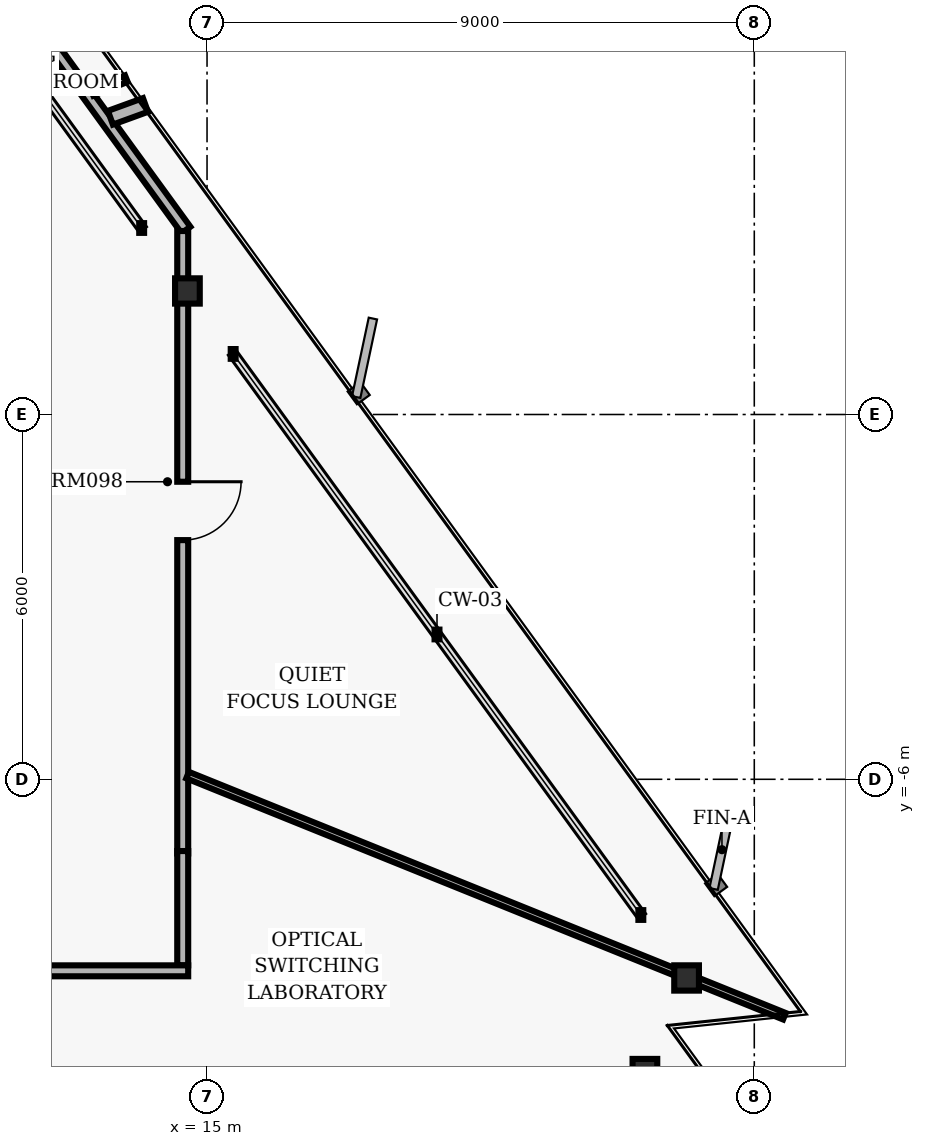
"""IFC4 building model, lengths in metres.
Left out: names, types, materials, properties, quantities, classifications, styles, units other than length and angle.
Written with IfcOpenShell. Run it as: python <this file> out.ifc"""

import sys

from ifc_helpers import new_model, si_unit, direction, frame, frame_2d, origin, origin_2d, place, context, subcontext, project, spatial, rectangle, i_section, extrude, element, fill, save


model = new_model("IFC4")
c1 = context("Model", 3, precision=1e-05, world=origin(), true_north=direction((0.0, 1.0)))
c2 = subcontext(c1, "Body", "Model", "MODEL_VIEW")
j1 = project(units=[si_unit("LENGTHUNIT", "METRE"), si_unit("PLANEANGLEUNIT", "RADIAN")], contexts=[c1])
p1 = place(None, origin())
s1 = spatial("IfcSite", under=j1, at=p1, CompositionType="ELEMENT")
p2 = place(p1, origin())
s2 = spatial("IfcBuilding", under=s1, at=p2, CompositionType="ELEMENT")
p3 = place(p2, frame((0.0, 0.0, 119.84)))
s3 = spatial("IfcBuildingStorey", under=s2, at=p3, CompositionType="ELEMENT", Elevation=119.84)
for number, where, z_axis, x_axis in (
    (1, (22.887, -9.268, 0.0), (0.0, 0.0, 1.0), (1.0, 0.0, 0.0)),
    (2, (14.677, 2.032, 0.0), (0.0, 0.0, 1.0), (1.0, 0.0, 0.0)),
    (3, (22.201, -10.807, 0.0), (0.0, 0.0, 1.0), (1.0, 0.0, 0.0)),
):
    element("IfcColumn", number, at=place(p3, frame(where, z_axis=z_axis, x_axis=x_axis)), inside=s3, PredefinedType="COLUMN", context=c2, shape_type="SweptSolid", body=[
        extrude(i_section(OverallWidth=0.406, OverallDepth=0.416, WebThickness=0.03, FlangeThickness=0.048, FilletRadius=0.02, at=origin_2d()), origin(), (0.0, 0.0, 1.0), 3.04),
    ])
p4 = place(p3, frame((10.263, 9.077, 0.0), z_axis=(0.0, 0.0, 1.0), x_axis=(0.587780951295, -0.809020119215, 0.0)))
e4 = element("IfcWall", 4, at=p4, inside=s3, PredefinedType="PARTITIONING", context=c2, shape_type="SweptSolid", body=[
    extrude(rectangle(XDim=7.469, YDim=0.18, at=frame_2d((3.734, 0.0))), origin(), (0.0, 0.0, 1.0), 2.763),
])
p5 = place(p3, frame((14.6, 3.018, 0.0), z_axis=(0.0, 0.0, 1.0), x_axis=(0.0, -1.0, 0.0)))
e5 = element("IfcWall", 5, at=p5, inside=s3, PredefinedType="PARTITIONING", context=c2, shape_type="SweptSolid", body=[
    extrude(rectangle(XDim=10.238, YDim=0.18, at=frame_2d((5.119, 0.0))), origin(), (0.0, 0.0, 1.0), 2.763),
])
p6 = place(p5, frame((4.124, 0.0, 0.0)))
e6 = element("IfcOpeningElement", 6, at=p6, cuts=e5, PredefinedType="OPENING", context=c2, shape_type="SweptSolid", body=[
    extrude(rectangle(XDim=0.96, YDim=2.02, at=frame_2d((0.48, 1.01))), frame((0.0, 0.1, 0.0), z_axis=(0.0, -1.0, 0.0), x_axis=(1.0, 0.0, 0.0)), (0.0, 0.0, 1.0), 0.2),
])
p7 = place(p3, frame((14.6, -7.18, 0.0), z_axis=(0.0, 0.0, 1.0), x_axis=(0.0, -1.0, 0.0)))
e7 = element("IfcWall", 7, at=p7, inside=s3, PredefinedType="PARTITIONING", context=c2, shape_type="SweptSolid", body=[
    extrude(rectangle(XDim=1.88, YDim=0.18, at=frame_2d((0.94, 0.0))), origin(), (0.0, 0.0, 1.0), 2.763),
])
p8 = place(p3, frame((14.69, -9.15, 0.0), z_axis=(0.0, 0.0, 1.0), x_axis=(-1.0, 0.0, 0.0)))
e8 = element("IfcWall", 8, at=p8, inside=s3, PredefinedType="PARTITIONING", context=c2, shape_type="SweptSolid", body=[
    extrude(rectangle(XDim=3.75, YDim=0.18, at=frame_2d((1.875, 0.0))), origin(), (0.0, 0.0, 1.0), 2.33),
])
p9 = place(p3, frame((14.68, -5.931, 0.0), z_axis=(0.0, 0.0, 1.0), x_axis=(0.927187622353, -0.374597267682, 0.0)))
e9 = element("IfcWall", 9, at=p9, inside=s3, PredefinedType="MOVABLE", context=c2, shape_type="SweptSolid", body=[
    extrude(rectangle(XDim=10.586, YDim=0.115, at=frame_2d((5.293, 0.0))), origin(), (0.0, 0.0, 1.0), 2.132),
])
p10 = place(p3, frame((13.41, 4.881, 0.0), z_axis=(0.0, 0.0, 1.0), x_axis=(0.939828255983, 0.341647258523, 0.0)))
e10 = element("IfcWall", 10, at=p10, inside=s3, PredefinedType="PARTITIONING", context=c2, shape_type="SweptSolid", body=[
    extrude(rectangle(XDim=0.614, YDim=0.24, at=frame_2d((0.307, 0.0))), origin(), (0.0, 0.0, 1.0), 2.763),
])
p11 = place(p3, frame((13.109, 5.296, 0.0), z_axis=(0.0, 0.0, 1.0), x_axis=(0.927169426613, 0.374642301875, 0.0)))
e11 = element("IfcWall", 11, at=p11, inside=s3, PredefinedType="MOVABLE", context=c2, shape_type="SweptSolid", body=[
    extrude(rectangle(XDim=0.608, YDim=0.115, at=frame_2d((0.304, 0.0))), origin(), (0.0, 0.0, 1.0), 2.763),
])
p12 = place(p6, origin())
e12 = element("IfcDoor", 12, at=p12, inside=s3, OperationType="SINGLE_SWING_LEFT", PredefinedType="DOOR", context=c2, shape_type="SweptSolid", body=[
    extrude(rectangle(XDim=0.96, YDim=2.02, at=frame_2d((0.48, 1.01))), frame((0.0, 0.025, 0.0), z_axis=(0.0, -1.0, 0.0), x_axis=(1.0, 0.0, 0.0)), (0.0, 0.0, 1.0), 0.05),
])
fill(e6, e12)
save(model, sys.argv[1])
